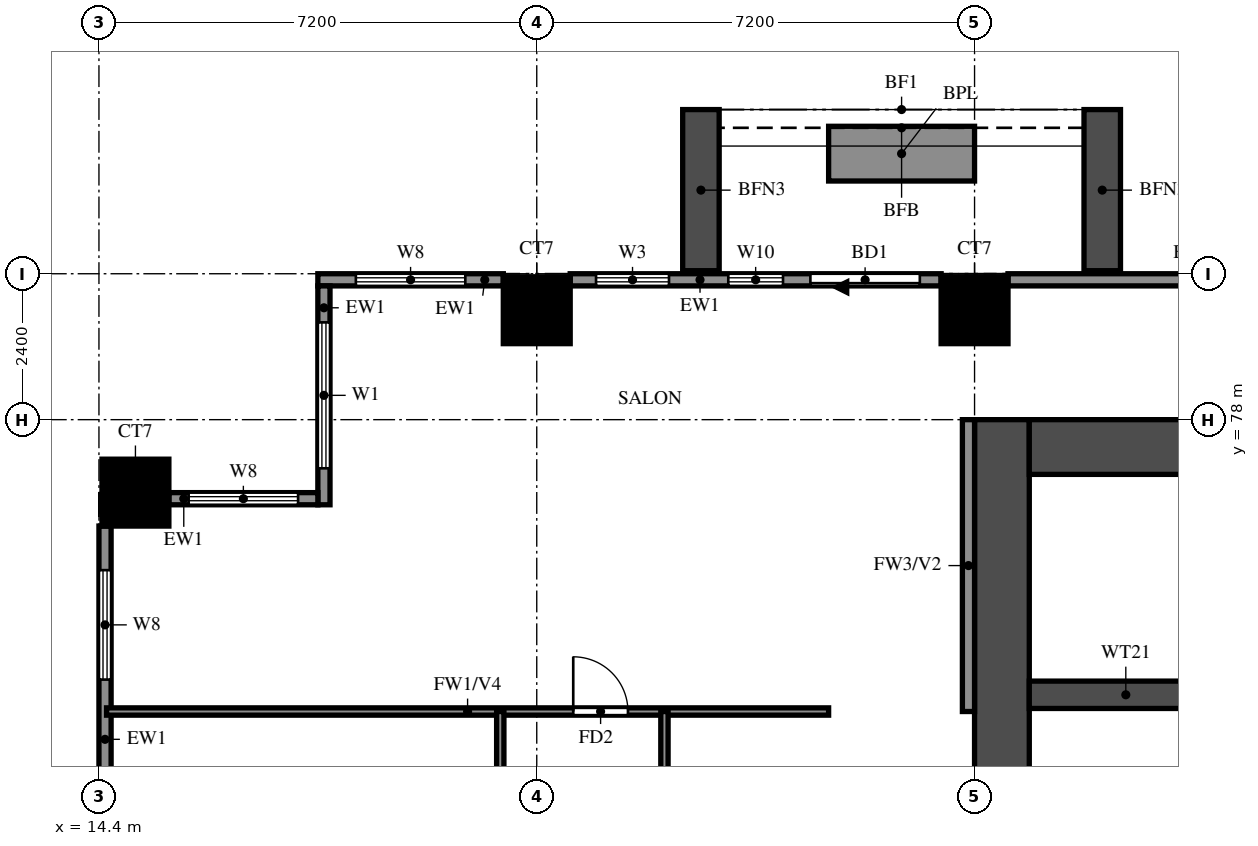
"""IFC4 building model, lengths in metres.
Left out: names, types, materials, properties, quantities, classifications, styles, units other than length and angle.
Written with IfcOpenShell. Run it as: python <this file> out.ifc"""

import sys

from ifc_helpers import new_model, si_unit, direction, frame, frame_2d, origin, origin_2d, place, context, subcontext, project, spatial, rectangle, extrude, source, transform, mapped, element, fill, save


model = new_model("IFC4")
c1 = context("Model", 3, precision=1e-05, world=origin(), true_north=direction((0.0, 1.0)))
c2 = subcontext(c1, "Body", "Model", "MODEL_VIEW")
j1 = project(units=[si_unit("LENGTHUNIT", "METRE"), si_unit("PLANEANGLEUNIT", "RADIAN")], contexts=[c1])
p1 = place(None, origin())
s1 = spatial("IfcSite", under=j1, at=p1, CompositionType="ELEMENT")
p2 = place(p1, origin())
s2 = spatial("IfcBuilding", under=s1, at=p2, CompositionType="ELEMENT")
p3 = place(p2, frame((0.0, 0.0, 30.5)))
s3 = spatial("IfcBuildingStorey", under=s2, at=p3, CompositionType="ELEMENT", Elevation=30.5)
m1 = source(origin(), c2, "Body", "SweptSolid", [
    extrude(rectangle(XDim=1.1, YDim=1.1, at=origin_2d()), origin(), (0.0, 0.0, 1.0), 3.18),
])
for number, where, z_axis, x_axis in (
    (1, (15.0, 76.8, 0.0), (0.0, 0.0, 1.0), (1.0, 0.0, 0.0)),
    (2, (21.6, 79.8, 0.0), (0.0, 0.0, 1.0), (1.0, 0.0, 0.0)),
    (3, (28.8, 79.8, 0.0), (0.0, 0.0, 1.0), (1.0, 0.0, 0.0)),
):
    element("IfcColumn", number, at=place(p3, frame(where, z_axis=z_axis, x_axis=x_axis)), inside=s3, PredefinedType="COLUMN", context=c2, shape_type="MappedRepresentation", body=[
        mapped(m1, transform((0.0, 0.0, 0.0))),
    ])
p4 = place(p3, frame((29.25, 66.0, 0.0), z_axis=(0.0, 0.0, 1.0), x_axis=(0.0, 1.0, 0.0)))
e4 = element("IfcWall", 4, at=p4, inside=s3, PredefinedType="SHEAR", context=c2, shape_type="SweptSolid", body=[
    extrude(rectangle(XDim=12.0, YDim=0.9, at=frame_2d((6.0, 0.0))), origin(), (0.0, 0.0, 1.0), 3.18),
])
p5 = place(p3, frame((29.7, 77.55, 0.0), z_axis=(0.0, 0.0, 1.0), x_axis=(1.0, 0.0, 0.0)))
e5 = element("IfcWall", 5, at=p5, inside=s3, PredefinedType="SHEAR", context=c2, shape_type="SweptSolid", body=[
    extrude(rectangle(XDim=41.4, YDim=0.9, at=frame_2d((20.7, 0.0))), origin(), (0.0, 0.0, 1.0), 3.18),
])
p6 = place(p3, frame((29.7, 73.475, 0.0), z_axis=(0.0, 0.0, 1.0), x_axis=(1.0, 0.0, 0.0)))
e6 = element("IfcWall", 6, at=p6, inside=s3, PredefinedType="SHEAR", context=c2, shape_type="SweptSolid", body=[
    extrude(rectangle(XDim=3.175, YDim=0.45, at=frame_2d((1.587, 0.0))), origin(), (0.0, 0.0, 1.0), 3.18),
])
p7 = place(p3, frame((35.45, 80.3, 0.0), z_axis=(0.0, 0.0, 1.0), x_axis=(-1.0, 0.0, 0.0)))
e7 = element("IfcWall", 7, at=p7, inside=s3, PredefinedType="SOLIDWALL", context=c2, shape_type="SweptSolid", body=[
    extrude(rectangle(XDim=6.1, YDim=0.2, at=frame_2d((3.05, 0.0))), origin(), (0.0, 0.0, 1.0), 3.18),
])
p8 = place(p3, frame((28.25, 80.3, 0.0), z_axis=(0.0, 0.0, 1.0), x_axis=(-1.0, 0.0, 0.0)))
e8 = element("IfcWall", 8, at=p8, inside=s3, PredefinedType="SOLIDWALL", context=c2, shape_type="SweptSolid", body=[
    extrude(rectangle(XDim=6.1, YDim=0.2, at=frame_2d((3.05, 0.0))), origin(), (0.0, 0.0, 1.0), 3.18),
])
p9 = place(p8, frame((0.35, 0.0, 0.0)))
e9 = element("IfcOpeningElement", 9, at=p9, cuts=e8, PredefinedType="OPENING", context=c2, shape_type="SweptSolid", body=[
    extrude(rectangle(XDim=1.8, YDim=2.4, at=frame_2d((0.9, 1.2))), frame((0.0, 0.11, 0.0), z_axis=(0.0, -1.0, 0.0), x_axis=(1.0, 0.0, 0.0)), (0.0, 0.0, 1.0), 0.22),
])
p10 = place(p8, frame((2.6, 0.0, 0.6)))
e10 = element("IfcOpeningElement", 10, at=p10, cuts=e8, PredefinedType="OPENING", context=c2, shape_type="SweptSolid", body=[
    extrude(rectangle(XDim=0.9, YDim=2.4, at=frame_2d((0.45, 1.2))), frame((0.0, 0.11, 0.0), z_axis=(0.0, -1.0, 0.0), x_axis=(1.0, 0.0, 0.0)), (0.0, 0.0, 1.0), 0.22),
])
p11 = place(p8, frame((4.475, 0.0, 0.6)))
e11 = element("IfcOpeningElement", 11, at=p11, cuts=e8, PredefinedType="OPENING", context=c2, shape_type="SweptSolid", body=[
    extrude(rectangle(XDim=1.2, YDim=2.4, at=frame_2d((0.6, 1.2))), frame((0.0, 0.11, 0.0), z_axis=(0.0, -1.0, 0.0), x_axis=(1.0, 0.0, 0.0)), (0.0, 0.0, 1.0), 0.22),
])
p12 = place(p3, frame((21.05, 80.3, 0.0), z_axis=(0.0, 0.0, 1.0), x_axis=(-1.0, 0.0, 0.0)))
e12 = element("IfcWall", 12, at=p12, inside=s3, PredefinedType="SOLIDWALL", context=c2, shape_type="SweptSolid", body=[
    extrude(rectangle(XDim=3.05, YDim=0.2, at=frame_2d((1.525, 0.0))), origin(), (0.0, 0.0, 1.0), 3.18),
])
p13 = place(p12, frame((0.625, 0.0, 0.6)))
e13 = element("IfcOpeningElement", 13, at=p13, cuts=e12, PredefinedType="OPENING", context=c2, shape_type="SweptSolid", body=[
    extrude(rectangle(XDim=1.8, YDim=2.4, at=frame_2d((0.9, 1.2))), frame((0.0, 0.11, 0.0), z_axis=(0.0, -1.0, 0.0), x_axis=(1.0, 0.0, 0.0)), (0.0, 0.0, 1.0), 0.22),
])
p14 = place(p3, frame((18.1, 80.2, 0.0), z_axis=(0.0, 0.0, 1.0), x_axis=(0.0, -1.0, 0.0)))
e14 = element("IfcWall", 14, at=p14, inside=s3, PredefinedType="SOLIDWALL", context=c2, shape_type="SweptSolid", body=[
    extrude(rectangle(XDim=3.6, YDim=0.2, at=frame_2d((1.8, 0.0))), origin(), (0.0, 0.0, 1.0), 3.18),
])
p15 = place(p14, frame((0.6, 0.0, 0.6)))
e15 = element("IfcOpeningElement", 15, at=p15, cuts=e14, PredefinedType="OPENING", context=c2, shape_type="SweptSolid", body=[
    extrude(rectangle(XDim=2.4, YDim=2.4, at=frame_2d((1.2, 1.2))), frame((0.0, 0.11, 0.0), z_axis=(0.0, -1.0, 0.0), x_axis=(1.0, 0.0, 0.0)), (0.0, 0.0, 1.0), 0.22),
])
p16 = place(p3, frame((18.0, 76.7, 0.0), z_axis=(0.0, 0.0, 1.0), x_axis=(-1.0, 0.0, 0.0)))
e16 = element("IfcWall", 16, at=p16, inside=s3, PredefinedType="SOLIDWALL", context=c2, shape_type="SweptSolid", body=[
    extrude(rectangle(XDim=2.45, YDim=0.2, at=frame_2d((1.225, 0.0))), origin(), (0.0, 0.0, 1.0), 3.18),
])
p17 = place(p16, frame((0.325, 0.0, 0.6)))
e17 = element("IfcOpeningElement", 17, at=p17, cuts=e16, PredefinedType="OPENING", context=c2, shape_type="SweptSolid", body=[
    extrude(rectangle(XDim=1.8, YDim=2.4, at=frame_2d((0.9, 1.2))), frame((0.0, 0.11, 0.0), z_axis=(0.0, -1.0, 0.0), x_axis=(1.0, 0.0, 0.0)), (0.0, 0.0, 1.0), 0.22),
])
p18 = place(p3, frame((14.5, 76.25, 0.0), z_axis=(0.0, 0.0, 1.0), x_axis=(0.0, -1.0, 0.0)))
e18 = element("IfcWall", 18, at=p18, inside=s3, PredefinedType="SOLIDWALL", context=c2, shape_type="SweptSolid", body=[
    extrude(rectangle(XDim=6.1, YDim=0.2, at=frame_2d((3.05, 0.0))), origin(), (0.0, 0.0, 1.0), 3.18),
])
p19 = place(p18, frame((4.025, 0.0, 1.5)))
e19 = element("IfcOpeningElement", 19, at=p19, cuts=e18, PredefinedType="OPENING", context=c2, shape_type="SweptSolid", body=[
    extrude(rectangle(XDim=0.9, YDim=0.9, at=frame_2d((0.45, 0.45))), frame((0.0, 0.11, 0.0), z_axis=(0.0, -1.0, 0.0), x_axis=(1.0, 0.0, 0.0)), (0.0, 0.0, 1.0), 0.22),
])
p20 = place(p18, frame((0.725, 0.0, 0.6)))
e20 = element("IfcOpeningElement", 20, at=p20, cuts=e18, PredefinedType="OPENING", context=c2, shape_type="SweptSolid", body=[
    extrude(rectangle(XDim=1.8, YDim=2.4, at=frame_2d((0.9, 1.2))), frame((0.0, 0.11, 0.0), z_axis=(0.0, -1.0, 0.0), x_axis=(1.0, 0.0, 0.0)), (0.0, 0.0, 1.0), 0.22),
])
for number, where, z_axis, x_axis in (
    (21, (30.9, 80.45, 0.0), (0.0, 0.0, 1.0), (0.0, 1.0, 0.0)),
    (22, (24.3, 80.45, 0.0), (0.0, 0.0, 1.0), (0.0, 1.0, 0.0)),
):
    element("IfcWall", number, at=place(p3, frame(where, z_axis=z_axis, x_axis=x_axis)), inside=s3, PredefinedType="SOLIDWALL", context=c2, shape_type="SweptSolid", body=[
        extrude(rectangle(XDim=2.65, YDim=0.6, at=frame_2d((1.325, 0.0))), origin(), (0.0, 0.0, 1.0), 2.85),
    ])
p21 = place(p3, frame((28.8, 82.375, 0.0), z_axis=(0.0, 0.0, 1.0), x_axis=(-1.0, 0.0, 0.0)))
e23 = element("IfcWall", 23, at=p21, inside=s3, PredefinedType="SOLIDWALL", context=c2, shape_type="SweptSolid", body=[
    extrude(rectangle(XDim=2.4, YDim=0.9, at=frame_2d((1.2, 0.0))), origin(), (0.0, 0.0, 1.0), 0.9),
])
p22 = place(p3, frame((28.7, 73.2, 0.0), z_axis=(0.0, 0.0, 1.0), x_axis=(0.0, 1.0, 0.0)))
e24 = element("IfcWall", 24, at=p22, inside=s3, PredefinedType="SOLIDWALL", context=c2, shape_type="SweptSolid", body=[
    extrude(rectangle(XDim=4.8, YDim=0.2, at=frame_2d((2.4, 0.0))), origin(), (0.0, 0.0, 1.0), 3.18),
])
p23 = place(p3, frame((14.525, 73.2, 0.0), z_axis=(0.0, 0.0, 1.0), x_axis=(1.0, 0.0, 0.0)))
e25 = element("IfcWall", 25, at=p23, inside=s3, PredefinedType="PARTITIONING", context=c2, shape_type="SweptSolid", body=[
    extrude(rectangle(XDim=11.875, YDim=0.12, at=frame_2d((5.938, 0.0))), origin(), (0.0, 0.0, 1.0), 2.28),
])
p24 = place(p23, frame((7.675, 0.0, 0.0)))
e26 = element("IfcOpeningElement", 26, at=p24, cuts=e25, PredefinedType="OPENING", context=c2, shape_type="SweptSolid", body=[
    extrude(rectangle(XDim=0.9, YDim=2.1, at=frame_2d((0.45, 1.05))), frame((0.0, 0.07, 0.0), z_axis=(0.0, -1.0, 0.0), x_axis=(1.0, 0.0, 0.0)), (0.0, 0.0, 1.0), 0.14),
])
p25 = place(p3, frame((21.0, 69.6, 0.0), z_axis=(0.0, 0.0, 1.0), x_axis=(0.0, 1.0, 0.0)))
e27 = element("IfcWall", 27, at=p25, inside=s3, PredefinedType="PARTITIONING", context=c2, shape_type="SweptSolid", body=[
    extrude(rectangle(XDim=3.6, YDim=0.12, at=frame_2d((1.8, 0.0))), origin(), (0.0, 0.0, 1.0), 3.18),
])
p26 = place(p3, frame((23.7, 64.8, 0.0), z_axis=(0.0, 0.0, 1.0), x_axis=(0.0, 1.0, 0.0)))
e28 = element("IfcWall", 28, at=p26, inside=s3, PredefinedType="PARTITIONING", context=c2, shape_type="SweptSolid", body=[
    extrude(rectangle(XDim=8.4, YDim=0.12, at=frame_2d((4.2, 0.0))), origin(), (0.0, 0.0, 1.0), 3.18),
])
p27 = place(p26, frame((4.875, 0.0, 0.0)))
e29 = element("IfcOpeningElement", 29, at=p27, cuts=e28, PredefinedType="OPENING", context=c2, shape_type="SweptSolid", body=[
    extrude(rectangle(XDim=0.9, YDim=2.1, at=frame_2d((0.45, 1.05))), frame((0.0, 0.07, 0.0), z_axis=(0.0, -1.0, 0.0), x_axis=(1.0, 0.0, 0.0)), (0.0, 0.0, 1.0), 0.14),
])
p28 = place(p9, origin())
e30 = element("IfcDoor", 30, at=p28, inside=s3, OperationType="DOUBLE_DOOR_SLIDING", PredefinedType="DOOR", context=c2, shape_type="SweptSolid", body=[
    extrude(rectangle(XDim=1.8, YDim=2.4, at=frame_2d((0.9, 1.2))), frame((0.0, 0.025, 0.0), z_axis=(0.0, -1.0, 0.0), x_axis=(1.0, 0.0, 0.0)), (0.0, 0.0, 1.0), 0.05),
])
fill(e9, e30)
p29 = place(p10, origin())
e31 = element("IfcWindow", 31, at=p29, inside=s3, PartitioningType="SINGLE_PANEL", PredefinedType="WINDOW", context=c2, shape_type="SweptSolid", body=[
    extrude(rectangle(XDim=0.9, YDim=2.4, at=frame_2d((0.45, 1.2))), frame((0.0, 0.03, 0.0), z_axis=(0.0, -1.0, 0.0), x_axis=(1.0, 0.0, 0.0)), (0.0, 0.0, 1.0), 0.06),
])
fill(e10, e31)
p30 = place(p11, origin())
e32 = element("IfcWindow", 32, at=p30, inside=s3, PartitioningType="SINGLE_PANEL", PredefinedType="WINDOW", context=c2, shape_type="SweptSolid", body=[
    extrude(rectangle(XDim=1.2, YDim=2.4, at=frame_2d((0.6, 1.2))), frame((0.0, 0.03, 0.0), z_axis=(0.0, -1.0, 0.0), x_axis=(1.0, 0.0, 0.0)), (0.0, 0.0, 1.0), 0.06),
])
fill(e11, e32)
p31 = place(p13, origin())
e33 = element("IfcWindow", 33, at=p31, inside=s3, PartitioningType="DOUBLE_PANEL_VERTICAL", PredefinedType="WINDOW", context=c2, shape_type="SweptSolid", body=[
    extrude(rectangle(XDim=1.8, YDim=2.4, at=frame_2d((0.9, 1.2))), frame((0.0, 0.03, 0.0), z_axis=(0.0, -1.0, 0.0), x_axis=(1.0, 0.0, 0.0)), (0.0, 0.0, 1.0), 0.06),
])
fill(e13, e33)
p32 = place(p15, origin())
e34 = element("IfcWindow", 34, at=p32, inside=s3, PartitioningType="DOUBLE_PANEL_VERTICAL", PredefinedType="WINDOW", context=c2, shape_type="SweptSolid", body=[
    extrude(rectangle(XDim=2.4, YDim=2.4, at=frame_2d((1.2, 1.2))), frame((0.0, 0.03, 0.0), z_axis=(0.0, -1.0, 0.0), x_axis=(1.0, 0.0, 0.0)), (0.0, 0.0, 1.0), 0.06),
])
fill(e15, e34)
p33 = place(p17, origin())
e35 = element("IfcWindow", 35, at=p33, inside=s3, PartitioningType="DOUBLE_PANEL_VERTICAL", PredefinedType="WINDOW", context=c2, shape_type="SweptSolid", body=[
    extrude(rectangle(XDim=1.8, YDim=2.4, at=frame_2d((0.9, 1.2))), frame((0.0, 0.03, 0.0), z_axis=(0.0, -1.0, 0.0), x_axis=(1.0, 0.0, 0.0)), (0.0, 0.0, 1.0), 0.06),
])
fill(e17, e35)
p34 = place(p20, origin())
e36 = element("IfcWindow", 36, at=p34, inside=s3, PartitioningType="DOUBLE_PANEL_VERTICAL", PredefinedType="WINDOW", context=c2, shape_type="SweptSolid", body=[
    extrude(rectangle(XDim=1.8, YDim=2.4, at=frame_2d((0.9, 1.2))), frame((0.0, 0.03, 0.0), z_axis=(0.0, -1.0, 0.0), x_axis=(1.0, 0.0, 0.0)), (0.0, 0.0, 1.0), 0.06),
])
fill(e20, e36)
p35 = place(p24, origin())
e37 = element("IfcDoor", 37, at=p35, inside=s3, OperationType="SINGLE_SWING_LEFT", PredefinedType="DOOR", context=c2, shape_type="SweptSolid", body=[
    extrude(rectangle(XDim=0.9, YDim=2.1, at=frame_2d((0.45, 1.05))), frame((0.0, 0.025, 0.0), z_axis=(0.0, -1.0, 0.0), x_axis=(1.0, 0.0, 0.0)), (0.0, 0.0, 1.0), 0.05),
])
fill(e26, e37)
save(model, sys.argv[1])
